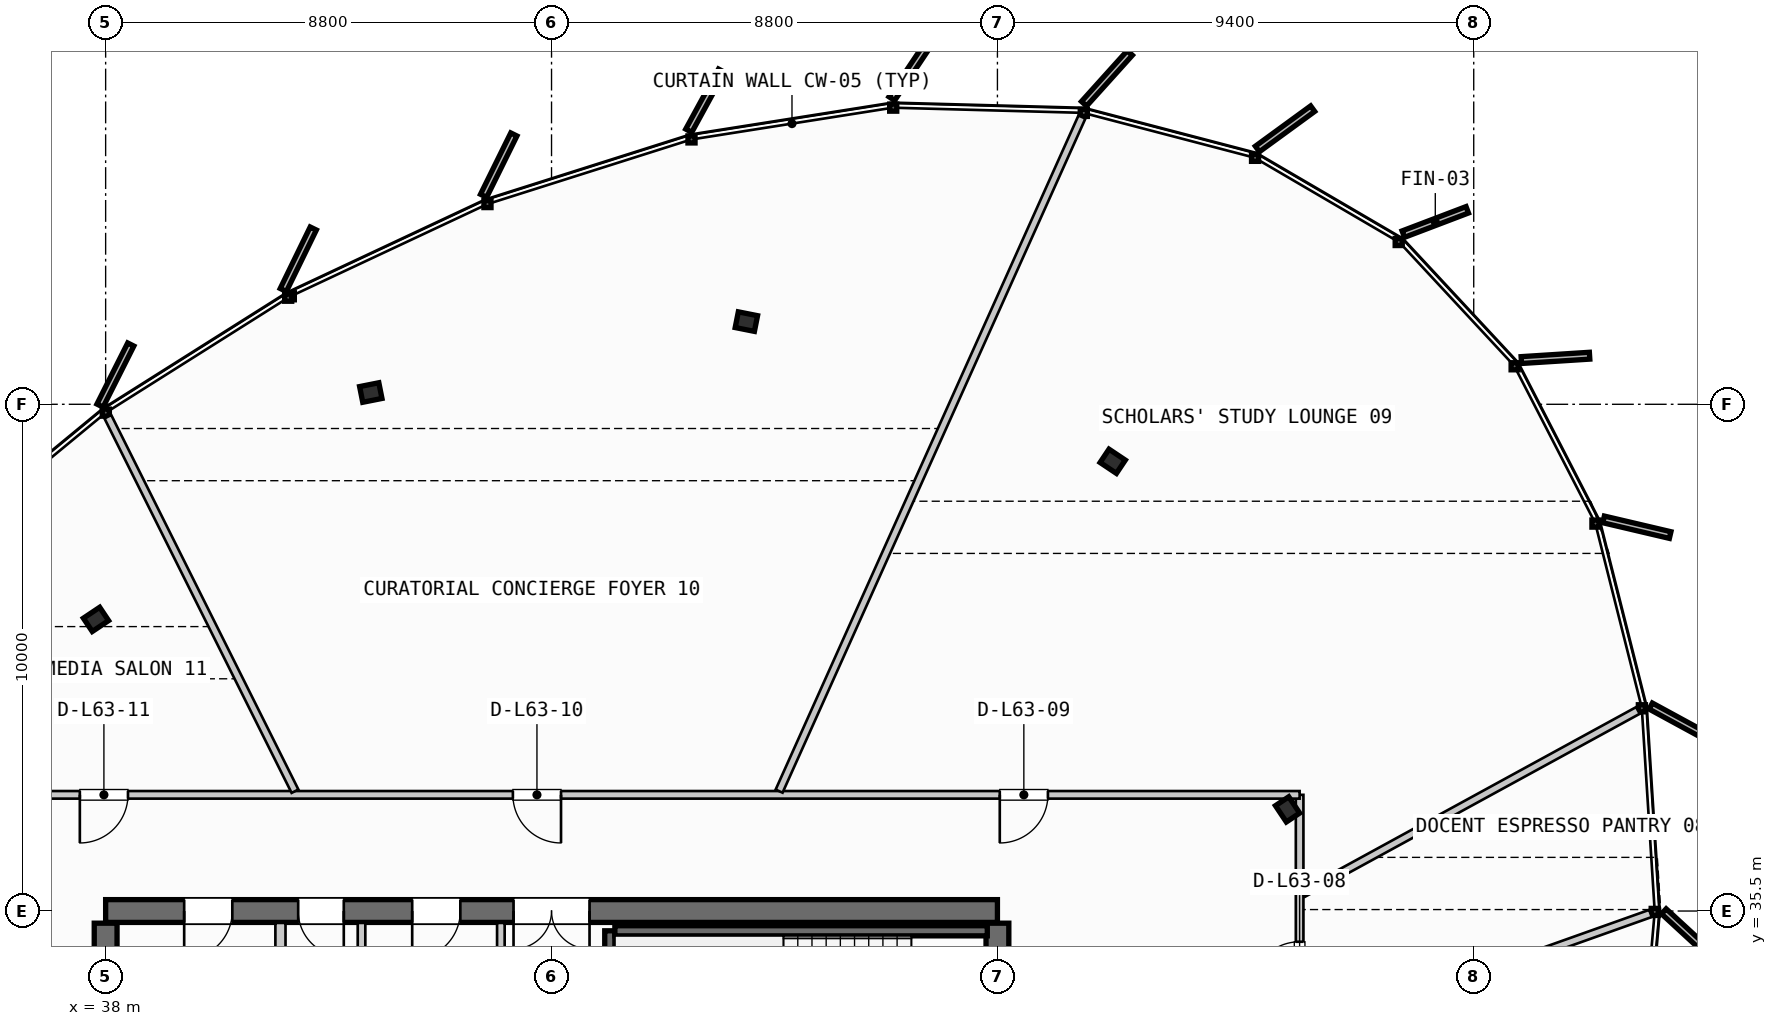
"""IFC4 building model, lengths in metres.
Left out: names, types, materials, properties, quantities, classifications, styles, units other than length and angle.
Written with IfcOpenShell. Run it as: python <this file> out.ifc"""

import sys

from ifc_helpers import new_model, si_unit, direction, frame, frame_2d, origin, origin_2d, place, context, subcontext, project, spatial, rectangle, i_section, extrude, source, transform, mapped, element, fill, save


model = new_model("IFC4")
c1 = context("Model", 3, precision=1e-05, world=origin(), true_north=direction((0.0, 1.0)))
c2 = subcontext(c1, "Body", "Model", "MODEL_VIEW")
j1 = project(units=[si_unit("LENGTHUNIT", "METRE"), si_unit("PLANEANGLEUNIT", "RADIAN")], contexts=[c1])
p1 = place(None, origin())
s1 = spatial("IfcSite", under=j1, at=p1, CompositionType="ELEMENT")
p2 = place(p1, origin())
s2 = spatial("IfcBuilding", under=s1, at=p2, CompositionType="ELEMENT")
p3 = place(p2, frame((0.0, 0.0, 242.2)))
s3 = spatial("IfcBuildingStorey", under=s2, at=p3, CompositionType="ELEMENT", Elevation=242.2)
p4 = place(p3, frame((55.6, 35.5, 0.0), z_axis=(0.0, 0.0, 1.0), x_axis=(-1.0, 0.0, 0.0)))
e1 = element("IfcWall", 1, at=p4, inside=s3, PredefinedType="SHEAR", context=c2, shape_type="SweptSolid", body=[
    extrude(rectangle(XDim=17.6, YDim=0.45, at=frame_2d((8.8, 0.0))), origin(), (0.0, 0.0, 1.0), 3.21),
])
p5 = place(p4, frame((8.05, 0.0, 0.0)))
e2 = element("IfcOpeningElement", 2, at=p5, cuts=e1, PredefinedType="OPENING", context=c2, shape_type="SweptSolid", body=[
    extrude(rectangle(XDim=1.5, YDim=2.2, at=frame_2d((0.75, 1.1))), frame((0.0, 0.235, 0.0), z_axis=(0.0, -1.0, 0.0), x_axis=(1.0, 0.0, 0.0)), (0.0, 0.0, 1.0), 0.47),
])
p6 = place(p4, frame((15.1, 0.0, 0.0)))
e3 = element("IfcOpeningElement", 3, at=p6, cuts=e1, PredefinedType="OPENING", context=c2, shape_type="SweptSolid", body=[
    extrude(rectangle(XDim=0.95, YDim=2.15, at=frame_2d((0.475, 1.075))), frame((0.0, 0.235, 0.0), z_axis=(0.0, -1.0, 0.0), x_axis=(1.0, 0.0, 0.0)), (0.0, 0.0, 1.0), 0.47),
])
p7 = place(p4, frame((12.9, 0.0, 0.0)))
e4 = element("IfcOpeningElement", 4, at=p7, cuts=e1, PredefinedType="OPENING", context=c2, shape_type="SweptSolid", body=[
    extrude(rectangle(XDim=0.9, YDim=2.15, at=frame_2d((0.45, 1.075))), frame((0.0, 0.235, 0.0), z_axis=(0.0, -1.0, 0.0), x_axis=(1.0, 0.0, 0.0)), (0.0, 0.0, 1.0), 0.47),
])
p8 = place(p4, frame((10.6, 0.0, 0.0)))
e5 = element("IfcOpeningElement", 5, at=p8, cuts=e1, PredefinedType="OPENING", context=c2, shape_type="SweptSolid", body=[
    extrude(rectangle(XDim=0.95, YDim=2.15, at=frame_2d((0.475, 1.075))), frame((0.0, 0.235, 0.0), z_axis=(0.0, -1.0, 0.0), x_axis=(1.0, 0.0, 0.0)), (0.0, 0.0, 1.0), 0.47),
])
p9 = place(p3, frame((38.0, 35.26, 0.0), z_axis=(0.0, 0.0, 1.0), x_axis=(0.0, -1.0, 0.0)))
e6 = element("IfcWall", 6, at=p9, inside=s3, PredefinedType="SHEAR", context=c2, shape_type="SweptSolid", body=[
    extrude(rectangle(XDim=14.92, YDim=0.45, at=frame_2d((7.46, 0.0))), origin(), (0.0, 0.0, 1.0), 3.21),
])
p10 = place(p9, frame((5.21, 0.0, 0.0)))
e7 = element("IfcOpeningElement", 7, at=p10, cuts=e6, PredefinedType="OPENING", context=c2, shape_type="SweptSolid", body=[
    extrude(rectangle(XDim=1.1, YDim=2.2, at=frame_2d((0.55, 1.1))), frame((0.0, 0.235, 0.0), z_axis=(0.0, -1.0, 0.0), x_axis=(1.0, 0.0, 0.0)), (0.0, 0.0, 1.0), 0.47),
])
p11 = place(p3, frame((55.6, 20.34, 0.0), z_axis=(0.0, 0.0, 1.0), x_axis=(0.0, 1.0, 0.0)))
e8 = element("IfcWall", 8, at=p11, inside=s3, PredefinedType="SHEAR", context=c2, shape_type="SweptSolid", body=[
    extrude(rectangle(XDim=14.92, YDim=0.45, at=frame_2d((7.46, 0.0))), origin(), (0.0, 0.0, 1.0), 3.21),
])
p12 = place(p11, frame((12.71, 0.0, 0.0)))
e9 = element("IfcOpeningElement", 9, at=p12, cuts=e8, PredefinedType="OPENING", context=c2, shape_type="SweptSolid", body=[
    extrude(rectangle(XDim=1.05, YDim=2.15, at=frame_2d((0.525, 1.075))), frame((0.0, 0.235, 0.0), z_axis=(0.0, -1.0, 0.0), x_axis=(1.0, 0.0, 0.0)), (0.0, 0.0, 1.0), 0.47),
])
p13 = place(p11, frame((8.61, 0.0, 0.0)))
e10 = element("IfcOpeningElement", 10, at=p13, cuts=e8, PredefinedType="OPENING", context=c2, shape_type="SweptSolid", body=[
    extrude(rectangle(XDim=1.1, YDim=2.2, at=frame_2d((0.55, 1.1))), frame((0.0, 0.235, 0.0), z_axis=(0.0, -1.0, 0.0), x_axis=(1.0, 0.0, 0.0)), (0.0, 0.0, 1.0), 0.47),
])
m1 = source(origin(), c2, "Body", "SweptSolid", [
    extrude(i_section(OverallWidth=0.387, OverallDepth=0.316, WebThickness=0.019, FlangeThickness=0.028, FilletRadius=0.015, at=origin_2d()), origin(), (0.0, 0.0, 1.0), 3.21),
])
for number, where, z_axis, x_axis in (
    (11, (61.326, 37.506, 0.0), (0.0, 0.0, 1.0), (0.831, 0.556, 0.0)),
    (12, (57.875, 44.375, 0.0), (0.0, 0.0, 1.0), (0.556, 0.831, 0.0)),
    (13, (50.645, 47.132, 0.0), (0.0, 0.0, 1.0), (0.195, 0.981, 0.0)),
    (14, (43.233, 45.732, 0.0), (0.0, 0.0, 1.0), (-0.195, 0.981, 0.0)),
    (15, (37.81, 41.255, 0.0), (0.0, 0.0, 1.0), (-0.556, 0.831, 0.0)),
):
    element("IfcColumn", number, at=place(p3, frame(where, z_axis=z_axis, x_axis=x_axis)), inside=s3, PredefinedType="COLUMN", context=c2, shape_type="MappedRepresentation", body=[
        mapped(m1, transform((0.0, 0.0, 0.0), scale=1.0)),
    ])
p14 = place(p3, frame((47.95, 32.05, 0.0), z_axis=(0.0, 0.0, 1.0), x_axis=(0.0, 1.0, 0.0)))
e16 = element("IfcWall", 16, at=p14, inside=s3, PredefinedType="SHEAR", context=c2, shape_type="SweptSolid", body=[
    extrude(rectangle(XDim=3.06, YDim=0.2, at=frame_2d((1.53, 0.0))), origin(), (0.0, 0.0, 1.0), 3.21),
])
p15 = place(p3, frame((48.05, 35.11, 0.0), z_axis=(0.0, 0.0, 1.0), x_axis=(1.0, 0.0, 0.0)))
e17 = element("IfcWall", 17, at=p15, inside=s3, PredefinedType="SHEAR", context=c2, shape_type="SweptSolid", body=[
    extrude(rectangle(XDim=7.35, YDim=0.2, at=frame_2d((3.675, 0.0))), origin(), (0.0, 0.0, 1.0), 3.21),
])
p16 = place(p3, frame((41.45, 31.85, 0.0), z_axis=(0.0, 0.0, 1.0), x_axis=(0.0, 1.0, 0.0)))
e18 = element("IfcWall", 18, at=p16, inside=s3, PredefinedType="PARTITIONING", context=c2, shape_type="SweptSolid", body=[
    extrude(rectangle(XDim=3.415, YDim=0.2, at=frame_2d((1.708, 0.0))), origin(), (0.0, 0.0, 1.0), 2.28),
])
p17 = place(p3, frame((45.8, 31.85, 0.0), z_axis=(0.0, 0.0, 1.0), x_axis=(0.0, 1.0, 0.0)))
e19 = element("IfcWall", 19, at=p17, inside=s3, PredefinedType="PARTITIONING", context=c2, shape_type="SweptSolid", body=[
    extrude(rectangle(XDim=3.415, YDim=0.15, at=frame_2d((1.708, 0.0))), origin(), (0.0, 0.0, 1.0), 2.28),
])
p18 = place(p3, frame((43.05, 31.85, 0.0), z_axis=(0.0, 0.0, 1.0), x_axis=(0.0, 1.0, 0.0)))
e20 = element("IfcWall", 20, at=p18, inside=s3, PredefinedType="PLUMBINGWALL", context=c2, shape_type="SweptSolid", body=[
    extrude(rectangle(XDim=3.415, YDim=0.15, at=frame_2d((1.708, 0.0))), origin(), (0.0, 0.0, 1.0), 2.28),
])
p19 = place(p3, frame((61.564, 17.807, 0.0), z_axis=(0.0, 0.0, 1.0), x_axis=(0.0, 1.0, 0.0)))
e21 = element("IfcWall", 21, at=p19, inside=s3, PredefinedType="PARTITIONING", context=c2, shape_type="SweptSolid", body=[
    extrude(rectangle(XDim=19.986, YDim=0.15, at=frame_2d((9.993, 0.0))), origin(), (0.0, 0.0, 1.0), 2.28),
])
p20 = place(p19, frame((1.142, 0.0, 0.0)))
e22 = element("IfcOpeningElement", 22, at=p20, cuts=e21, PredefinedType="OPENING", context=c2, shape_type="SweptSolid", body=[
    extrude(rectangle(XDim=0.95, YDim=2.15, at=frame_2d((0.475, 1.075))), frame((0.0, 0.085, 0.0), z_axis=(0.0, -1.0, 0.0), x_axis=(1.0, 0.0, 0.0)), (0.0, 0.0, 1.0), 0.17),
])
p21 = place(p19, frame((8.436, 0.0, 0.0)))
e23 = element("IfcOpeningElement", 23, at=p21, cuts=e21, PredefinedType="OPENING", context=c2, shape_type="SweptSolid", body=[
    extrude(rectangle(XDim=0.95, YDim=2.15, at=frame_2d((0.475, 1.075))), frame((0.0, 0.085, 0.0), z_axis=(0.0, -1.0, 0.0), x_axis=(1.0, 0.0, 0.0)), (0.0, 0.0, 1.0), 0.17),
])
p22 = place(p19, frame((16.137, 0.0, 0.0)))
e24 = element("IfcOpeningElement", 24, at=p22, cuts=e21, PredefinedType="OPENING", context=c2, shape_type="SweptSolid", body=[
    extrude(rectangle(XDim=0.95, YDim=2.15, at=frame_2d((0.475, 1.075))), frame((0.0, 0.085, 0.0), z_axis=(0.0, -1.0, 0.0), x_axis=(1.0, 0.0, 0.0)), (0.0, 0.0, 1.0), 0.17),
])
p23 = place(p3, frame((61.564, 37.793, 0.0), z_axis=(0.0, 0.0, 1.0), x_axis=(-1.0, 0.0, 0.0)))
e25 = element("IfcWall", 25, at=p23, inside=s3, PredefinedType="PARTITIONING", context=c2, shape_type="SweptSolid", body=[
    extrude(rectangle(XDim=30.274, YDim=0.15, at=frame_2d((15.137, 0.0))), origin(), (0.0, 0.0, 1.0), 2.28),
])
p24 = place(p23, frame((4.968, 0.0, 0.0)))
e26 = element("IfcOpeningElement", 26, at=p24, cuts=e25, PredefinedType="OPENING", context=c2, shape_type="SweptSolid", body=[
    extrude(rectangle(XDim=0.95, YDim=2.15, at=frame_2d((0.475, 1.075))), frame((0.0, 0.085, 0.0), z_axis=(0.0, -1.0, 0.0), x_axis=(1.0, 0.0, 0.0)), (0.0, 0.0, 1.0), 0.17),
])
p25 = place(p23, frame((14.577, 0.0, 0.0)))
e27 = element("IfcOpeningElement", 27, at=p25, cuts=e25, PredefinedType="OPENING", context=c2, shape_type="SweptSolid", body=[
    extrude(rectangle(XDim=0.95, YDim=2.15, at=frame_2d((0.475, 1.075))), frame((0.0, 0.085, 0.0), z_axis=(0.0, -1.0, 0.0), x_axis=(1.0, 0.0, 0.0)), (0.0, 0.0, 1.0), 0.17),
])
p26 = place(p23, frame((23.123, 0.0, 0.0)))
e28 = element("IfcOpeningElement", 28, at=p26, cuts=e25, PredefinedType="OPENING", context=c2, shape_type="SweptSolid", body=[
    extrude(rectangle(XDim=0.95, YDim=2.15, at=frame_2d((0.475, 1.075))), frame((0.0, 0.085, 0.0), z_axis=(0.0, -1.0, 0.0), x_axis=(1.0, 0.0, 0.0)), (0.0, 0.0, 1.0), 0.17),
])
p27 = place(p3, frame((61.639, 33.017, 0.0), z_axis=(0.0, 0.0, 1.0), x_axis=(0.942197017818, 0.335059367299, 0.0)))
e29 = element("IfcWall", 29, at=p27, inside=s3, PredefinedType="PARTITIONING", context=c2, shape_type="SweptSolid", body=[
    extrude(rectangle(XDim=7.268, YDim=0.15, at=frame_2d((3.634, 0.0))), origin(), (0.0, 0.0, 1.0), 2.28),
])
p28 = place(p3, frame((61.634, 35.847, 0.0), z_axis=(0.0, 0.0, 1.0), x_axis=(0.877463915814, 0.479642654947, 0.0)))
e30 = element("IfcWall", 30, at=p28, inside=s3, PredefinedType="PARTITIONING", context=c2, shape_type="SweptSolid", body=[
    extrude(rectangle(XDim=7.528, YDim=0.15, at=frame_2d((3.764, 0.0))), origin(), (0.0, 0.0, 1.0), 2.28),
])
p29 = place(p3, frame((51.291, 37.866, 0.0), z_axis=(0.0, 0.0, 1.0), x_axis=(0.409799377138, 0.912175679624, 0.0)))
e31 = element("IfcWall", 31, at=p29, inside=s3, PredefinedType="PARTITIONING", context=c2, shape_type="SweptSolid", body=[
    extrude(rectangle(XDim=14.583, YDim=0.15, at=frame_2d((7.292, 0.0))), origin(), (0.0, 0.0, 1.0), 2.28),
])
p30 = place(p3, frame((41.737, 37.865, 0.0), z_axis=(0.0, 0.0, 1.0), x_axis=(-0.447048102033, 0.894509918597, 0.0)))
e32 = element("IfcWall", 32, at=p30, inside=s3, PredefinedType="PARTITIONING", context=c2, shape_type="SweptSolid", body=[
    extrude(rectangle(XDim=8.262, YDim=0.15, at=frame_2d((4.131, 0.0))), origin(), (0.0, 0.0, 1.0), 2.28),
])
m2 = source(origin(), c2, "Body", "SweptSolid", [
    extrude(rectangle(XDim=1.5, YDim=2.2, at=frame_2d((0.75, 1.1))), frame((0.0, 0.025, 0.0), z_axis=(0.0, -1.0, 0.0), x_axis=(1.0, 0.0, 0.0)), (0.0, 0.0, 1.0), 0.05),
])
p31 = place(p5, origin())
e33 = element("IfcDoor", 33, at=p31, inside=s3, OperationType="DOUBLE_DOOR_SINGLE_SWING", PredefinedType="DOOR", context=c2, shape_type="MappedRepresentation", body=[
    mapped(m2, transform((0.0, 0.0, 0.0), scale=1.0)),
])
fill(e2, e33)
m3 = source(origin(), c2, "Body", "SweptSolid", [
    extrude(rectangle(XDim=0.95, YDim=2.15, at=frame_2d((0.475, 1.075))), frame((0.0, 0.025, 0.0), z_axis=(0.0, -1.0, 0.0), x_axis=(1.0, 0.0, 0.0)), (0.0, 0.0, 1.0), 0.05),
])
p32 = place(p6, origin())
e34 = element("IfcDoor", 34, at=p32, inside=s3, OperationType="SINGLE_SWING_RIGHT", PredefinedType="DOOR", context=c2, shape_type="MappedRepresentation", body=[
    mapped(m3, transform((0.0, 0.0, 0.0), scale=1.0)),
])
fill(e3, e34)
m4 = source(origin(), c2, "Body", "SweptSolid", [
    extrude(rectangle(XDim=0.9, YDim=2.15, at=frame_2d((0.45, 1.075))), frame((0.0, 0.025, 0.0), z_axis=(0.0, -1.0, 0.0), x_axis=(1.0, 0.0, 0.0)), (0.0, 0.0, 1.0), 0.05),
])
p33 = place(p7, origin())
e35 = element("IfcDoor", 35, at=p33, inside=s3, OperationType="SINGLE_SWING_LEFT", PredefinedType="DOOR", context=c2, shape_type="MappedRepresentation", body=[
    mapped(m4, transform((0.0, 0.0, 0.0), scale=1.0)),
])
fill(e4, e35)
p34 = place(p8, origin())
e36 = element("IfcDoor", 36, at=p34, inside=s3, OperationType="SINGLE_SWING_RIGHT", PredefinedType="DOOR", context=c2, shape_type="MappedRepresentation", body=[
    mapped(m3, transform((0.0, 0.0, 0.0), scale=1.0)),
])
fill(e5, e36)
p35 = place(p22, origin())
e37 = element("IfcDoor", 37, at=p35, inside=s3, OperationType="SINGLE_SWING_LEFT", PredefinedType="DOOR", context=c2, shape_type="MappedRepresentation", body=[
    mapped(m3, transform((0.0, 0.0, 0.0), scale=1.0)),
])
fill(e24, e37)
p36 = place(p24, origin())
e38 = element("IfcDoor", 38, at=p36, inside=s3, OperationType="SINGLE_SWING_RIGHT", PredefinedType="DOOR", context=c2, shape_type="MappedRepresentation", body=[
    mapped(m3, transform((0.0, 0.0, 0.0), scale=1.0)),
])
fill(e26, e38)
p37 = place(p25, origin())
e39 = element("IfcDoor", 39, at=p37, inside=s3, OperationType="SINGLE_SWING_LEFT", PredefinedType="DOOR", context=c2, shape_type="MappedRepresentation", body=[
    mapped(m3, transform((0.0, 0.0, 0.0), scale=1.0)),
])
fill(e27, e39)
p38 = place(p26, origin())
e40 = element("IfcDoor", 40, at=p38, inside=s3, OperationType="SINGLE_SWING_RIGHT", PredefinedType="DOOR", context=c2, shape_type="MappedRepresentation", body=[
    mapped(m3, transform((0.0, 0.0, 0.0), scale=1.0)),
])
fill(e28, e40)
save(model, sys.argv[1])
